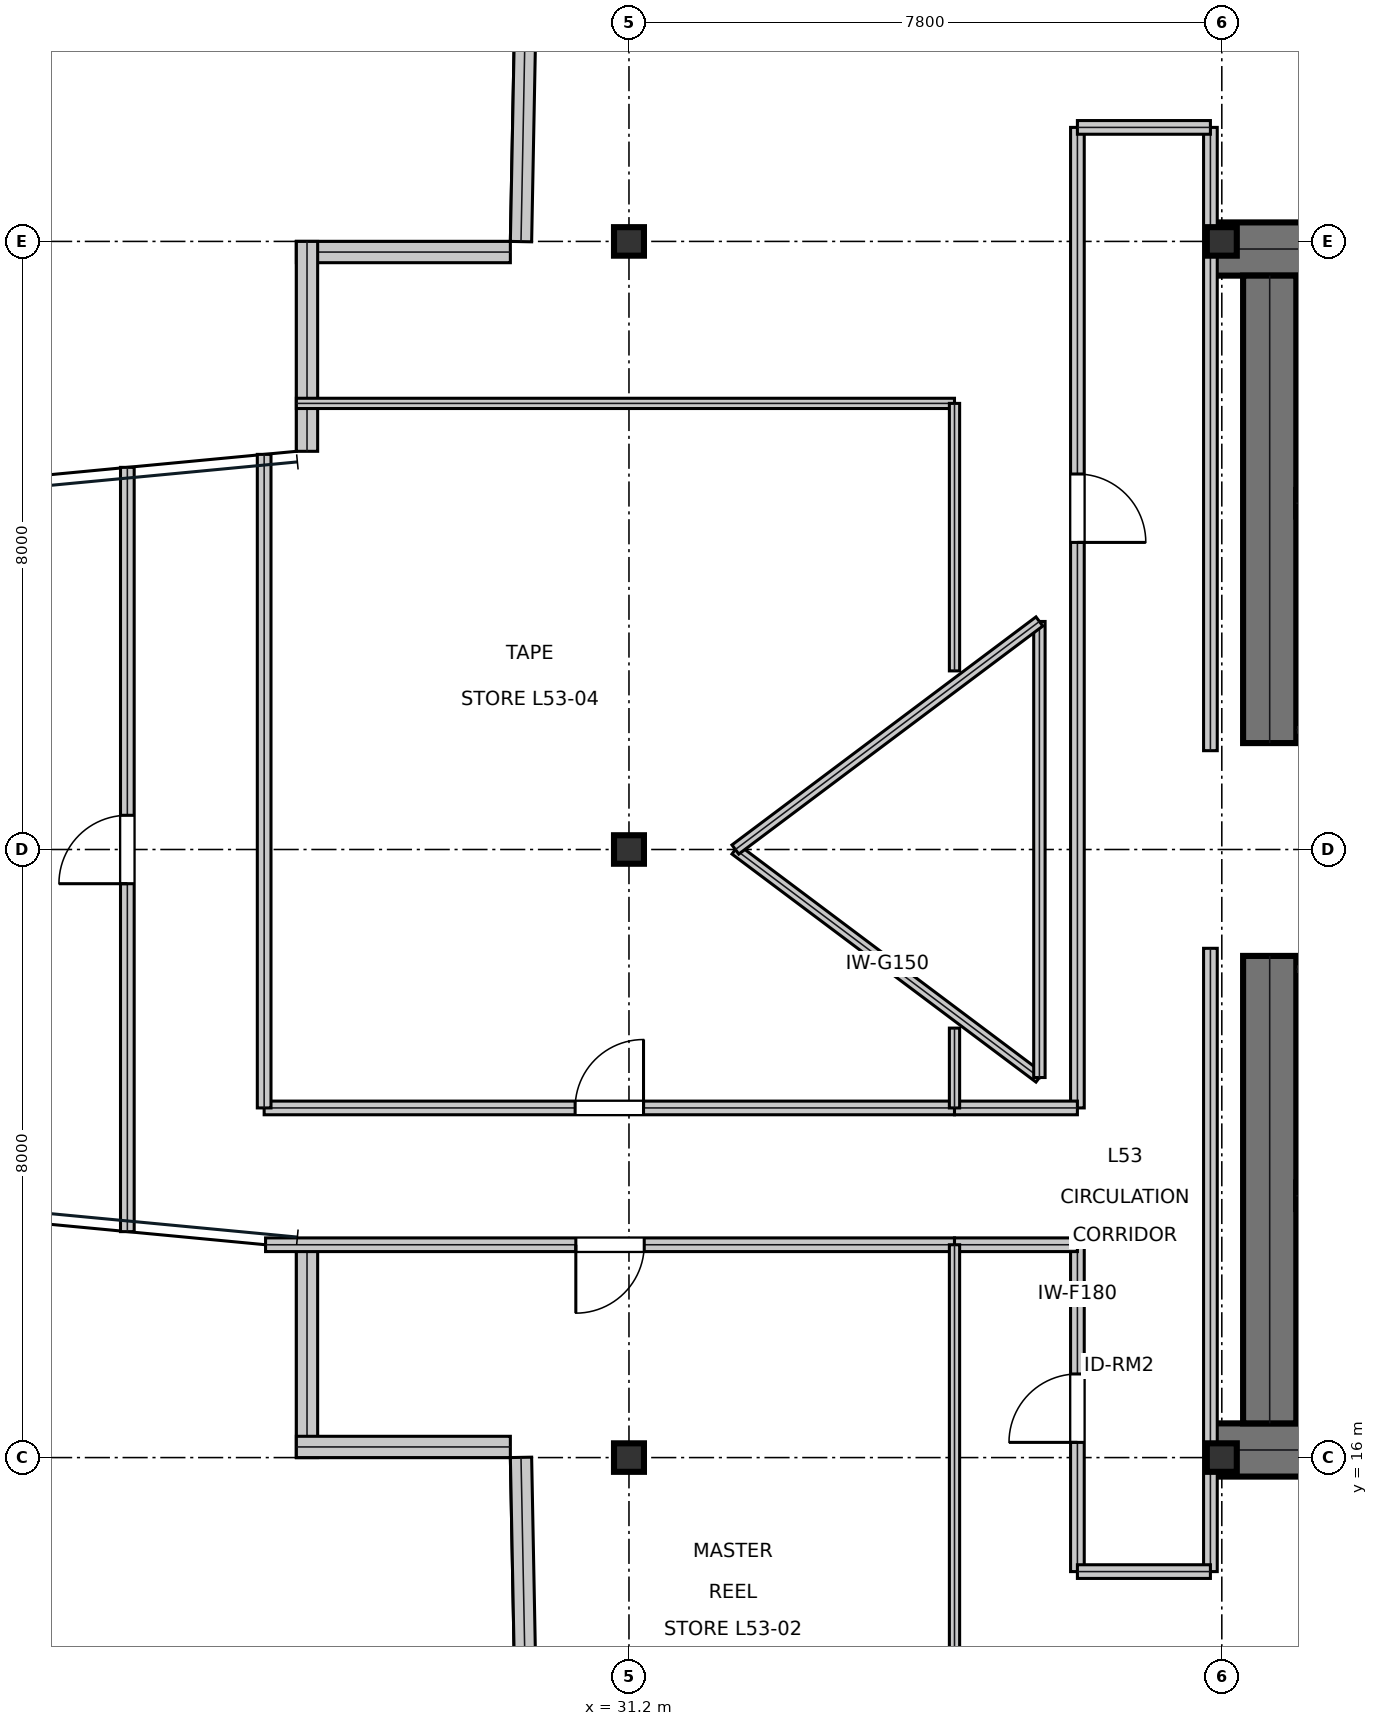
"""IFC4 building model, lengths in metres.
Left out: names, types, materials, properties, quantities, classifications, styles, units other than length and angle.
Written with IfcOpenShell. Run it as: python <this file> out.ifc"""

import sys

from ifc_helpers import new_model, si_unit, direction, frame, frame_2d, origin, origin_2d, place, context, subcontext, project, spatial, rectangle, i_section, extrude, element, fill, save


model = new_model("IFC4")
c1 = context("Model", 3, precision=1e-05, world=origin(), true_north=direction((0.0, 1.0)))
c2 = subcontext(c1, "Body", "Model", "MODEL_VIEW")
j1 = project(units=[si_unit("LENGTHUNIT", "METRE"), si_unit("PLANEANGLEUNIT", "RADIAN")], contexts=[c1])
p1 = place(None, origin())
s1 = spatial("IfcSite", under=j1, at=p1, CompositionType="ELEMENT")
p2 = place(p1, origin())
s2 = spatial("IfcBuilding", under=s1, at=p2, CompositionType="ELEMENT")
p3 = place(p2, frame((0.0, 0.0, 228.3)))
s3 = spatial("IfcBuildingStorey", under=s2, at=p3, CompositionType="ELEMENT", Elevation=228.3)
for number, where, z_axis, x_axis in (
    (1, (38.8, 31.9, 0.0), (0.0, 0.0, 1.0), (1.0, 0.0, 0.0)),
    (2, (38.8, 16.1, 0.0), (0.0, 0.0, 1.0), (1.0, 0.0, 0.0)),
):
    element("IfcWall", number, at=place(p3, frame(where, z_axis=z_axis, x_axis=x_axis)), inside=s3, PredefinedType="SHEAR", context=c2, shape_type="SweptSolid", body=[
        extrude(rectangle(XDim=16.0, YDim=0.7, at=frame_2d((8.0, 0.0))), origin(), (0.0, 0.0, 1.0), 3.79),
    ])
for number, where, z_axis, x_axis in (
    (3, (39.63, 16.45, 0.0), (0.0, 0.0, 1.0), (0.0, 1.0, 0.0)),
    (4, (39.63, 25.4, 0.0), (0.0, 0.0, 1.0), (0.0, 1.0, 0.0)),
):
    element("IfcWall", number, at=place(p3, frame(where, z_axis=z_axis, x_axis=x_axis)), inside=s3, PredefinedType="SHEAR", context=c2, shape_type="SweptSolid", body=[
        extrude(rectangle(XDim=6.15, YDim=0.7, at=frame_2d((3.075, 0.0))), origin(), (0.0, 0.0, 1.0), 3.79),
    ])
p4 = place(p3, frame((39.98, 28.555, 0.0), z_axis=(0.0, 0.0, 1.0), x_axis=(1.0, 0.0, 0.0)))
e5 = element("IfcWall", 5, at=p4, inside=s3, PredefinedType="SHEAR", context=c2, shape_type="SweptSolid", body=[
    extrude(rectangle(XDim=7.71, YDim=0.35, at=frame_2d((3.855, 0.0))), origin(), (0.0, 0.0, 1.0), 3.79),
])
p5 = place(p4, frame((0.25, 0.0, 0.0)))
e6 = element("IfcOpeningElement", 6, at=p5, cuts=e5, PredefinedType="OPENING", context=c2, shape_type="SweptSolid", body=[
    extrude(rectangle(XDim=1.1, YDim=2.15, at=frame_2d((0.55, 1.075))), frame((0.0, 0.185, 0.0), z_axis=(0.0, -1.0, 0.0), x_axis=(1.0, 0.0, 0.0)), (0.0, 0.0, 1.0), 0.37),
])
p6 = place(p3, frame((39.98, 19.445, 0.0), z_axis=(0.0, 0.0, 1.0), x_axis=(1.0, 0.0, 0.0)))
e7 = element("IfcWall", 7, at=p6, inside=s3, PredefinedType="SHEAR", context=c2, shape_type="SweptSolid", body=[
    extrude(rectangle(XDim=7.71, YDim=0.35, at=frame_2d((3.855, 0.0))), origin(), (0.0, 0.0, 1.0), 3.79),
])
p7 = place(p6, frame((0.25, 0.0, 0.0)))
e8 = element("IfcOpeningElement", 8, at=p7, cuts=e7, PredefinedType="OPENING", context=c2, shape_type="SweptSolid", body=[
    extrude(rectangle(XDim=1.1, YDim=2.15, at=frame_2d((0.55, 1.075))), frame((0.0, 0.185, 0.0), z_axis=(0.0, -1.0, 0.0), x_axis=(1.0, 0.0, 0.0)), (0.0, 0.0, 1.0), 0.37),
])
for number, where, z_axis, x_axis in (
    (9, (31.2, 16.0, 0.0), (0.0, 0.0, 1.0), (1.0, 0.0, 0.0)),
    (10, (31.2, 24.0, 0.0), (0.0, 0.0, 1.0), (1.0, 0.0, 0.0)),
    (11, (31.2, 32.0, 0.0), (0.0, 0.0, 1.0), (1.0, 0.0, 0.0)),
    (12, (39.0, 16.0, 0.0), (0.0, 0.0, 1.0), (1.0, 0.0, 0.0)),
    (13, (39.0, 32.0, 0.0), (0.0, 0.0, 1.0), (1.0, 0.0, 0.0)),
):
    element("IfcColumn", number, at=place(p3, frame(where, z_axis=z_axis, x_axis=x_axis)), inside=s3, PredefinedType="COLUMN", context=c2, shape_type="SweptSolid", body=[
        extrude(i_section(OverallWidth=0.394, OverallDepth=0.375, WebThickness=0.017, FlangeThickness=0.028, at=origin_2d()), origin(), (0.0, 0.0, 1.0), 4.044),
    ])
p8 = place(p3, frame((29.917, 39.19, 0.0), z_axis=(0.0, 0.0, 1.0), x_axis=(-0.019207643139, -0.999815516205, 0.0)))
e14 = element("IfcWall", 14, at=p8, inside=s3, PredefinedType="STANDARD", context=c2, shape_type="SweptSolid", body=[
    extrude(rectangle(XDim=7.194, YDim=0.28, at=frame_2d((3.597, 0.0))), origin(), (0.0, 0.0, 1.0), 3.79),
])
p9 = place(p3, frame((29.639, 31.86, 0.0), z_axis=(0.0, 0.0, 1.0), x_axis=(-1.0, 0.0, 0.0)))
e15 = element("IfcWall", 15, at=p9, inside=s3, PredefinedType="STANDARD", context=c2, shape_type="SweptSolid", body=[
    extrude(rectangle(XDim=2.815, YDim=0.28, at=frame_2d((1.408, 0.0))), origin(), (0.0, 0.0, 1.0), 3.79),
])
for number, where, z_axis, x_axis in (
    (16, (26.964, 32.0, 0.0), (0.0, 0.0, 1.0), (0.0, -1.0, 0.0)),
    (17, (26.964, 18.761, 0.0), (0.0, 0.0, 1.0), (0.0, -1.0, 0.0)),
):
    element("IfcWall", number, at=place(p3, frame(where, z_axis=z_axis, x_axis=x_axis)), inside=s3, PredefinedType="STANDARD", context=c2, shape_type="SweptSolid", body=[
        extrude(rectangle(XDim=2.761, YDim=0.28, at=frame_2d((1.381, 0.0))), origin(), (0.0, 0.0, 1.0), 3.319),
    ])
p10 = place(p3, frame((26.824, 16.14, 0.0), z_axis=(0.0, 0.0, 1.0), x_axis=(1.0, 0.0, 0.0)))
e18 = element("IfcWall", 18, at=p10, inside=s3, PredefinedType="STANDARD", context=c2, shape_type="SweptSolid", body=[
    extrude(rectangle(XDim=2.815, YDim=0.28, at=frame_2d((1.408, 0.0))), origin(), (0.0, 0.0, 1.0), 3.79),
])
p11 = place(p3, frame((29.779, 16.003, 0.0), z_axis=(0.0, 0.0, 1.0), x_axis=(0.019207643139, -0.999815516205, 0.0)))
e19 = element("IfcWall", 19, at=p11, inside=s3, PredefinedType="STANDARD", context=c2, shape_type="SweptSolid", body=[
    extrude(rectangle(XDim=7.194, YDim=0.28, at=frame_2d((3.597, 0.0))), origin(), (0.0, 0.0, 1.0), 3.79),
])
p12 = place(p3, frame((39.98, 25.575, 0.0), z_axis=(0.0, 0.0, 1.0), x_axis=(1.0, 0.0, 0.0)))
e20 = element("IfcWall", 20, at=p12, inside=s3, PredefinedType="PARTITIONING", context=c2, shape_type="SweptSolid", body=[
    extrude(rectangle(XDim=5.9, YDim=0.15, at=frame_2d((2.95, 0.0))), origin(), (0.0, 0.0, 1.0), 3.79),
])
p13 = place(p12, frame((2.35, 0.0, 0.0)))
e21 = element("IfcOpeningElement", 21, at=p13, cuts=e20, PredefinedType="OPENING", context=c2, shape_type="SweptSolid", body=[
    extrude(rectangle(XDim=1.05, YDim=2.15, at=frame_2d((0.525, 1.075))), frame((0.0, 0.085, 0.0), z_axis=(0.0, -1.0, 0.0), x_axis=(1.0, 0.0, 0.0)), (0.0, 0.0, 1.0), 0.17),
])
p14 = place(p3, frame((39.98, 22.425, 0.0), z_axis=(0.0, 0.0, 1.0), x_axis=(1.0, 0.0, 0.0)))
e22 = element("IfcWall", 22, at=p14, inside=s3, PredefinedType="PARTITIONING", context=c2, shape_type="SweptSolid", body=[
    extrude(rectangle(XDim=5.9, YDim=0.15, at=frame_2d((2.95, 0.0))), origin(), (0.0, 0.0, 1.0), 3.79),
])
p15 = place(p14, frame((2.35, 0.0, 0.0)))
e23 = element("IfcOpeningElement", 23, at=p15, cuts=e22, PredefinedType="OPENING", context=c2, shape_type="SweptSolid", body=[
    extrude(rectangle(XDim=1.05, YDim=2.15, at=frame_2d((0.525, 1.075))), frame((0.0, 0.085, 0.0), z_axis=(0.0, -1.0, 0.0), x_axis=(1.0, 0.0, 0.0)), (0.0, 0.0, 1.0), 0.17),
])
p16 = place(p3, frame((37.1, 14.5, 0.0), z_axis=(0.0, 0.0, 1.0), x_axis=(0.0, 1.0, 0.0)))
e24 = element("IfcWall", 24, at=p16, inside=s3, PredefinedType="SOLIDWALL", context=c2, shape_type="SweptSolid", body=[
    extrude(rectangle(XDim=4.3, YDim=0.18, at=frame_2d((2.15, 0.0))), origin(), (0.0, 0.0, 1.0), 3.241),
])
p17 = place(p16, frame((1.7, 0.0, 0.0)))
e25 = element("IfcOpeningElement", 25, at=p17, cuts=e24, PredefinedType="OPENING", context=c2, shape_type="SweptSolid", body=[
    extrude(rectangle(XDim=0.9, YDim=2.15, at=frame_2d((0.45, 1.075))), frame((0.0, 0.1, 0.0), z_axis=(0.0, -1.0, 0.0), x_axis=(1.0, 0.0, 0.0)), (0.0, 0.0, 1.0), 0.2),
])
p18 = place(p3, frame((26.418, 18.8, 0.0), z_axis=(0.0, 0.0, 1.0), x_axis=(1.0, 0.0, 0.0)))
e26 = element("IfcWall", 26, at=p18, inside=s3, PredefinedType="SOLIDWALL", context=c2, shape_type="SweptSolid", body=[
    extrude(rectangle(XDim=9.064, YDim=0.18, at=frame_2d((4.532, 0.0))), origin(), (0.0, 0.0, 1.0), 3.241),
])
p19 = place(p18, frame((4.082, 0.0, 0.0)))
e27 = element("IfcOpeningElement", 27, at=p19, cuts=e26, PredefinedType="OPENING", context=c2, shape_type="SweptSolid", body=[
    extrude(rectangle(XDim=0.9, YDim=2.15, at=frame_2d((0.45, 1.075))), frame((0.0, 0.1, 0.0), z_axis=(0.0, -1.0, 0.0), x_axis=(1.0, 0.0, 0.0)), (0.0, 0.0, 1.0), 0.2),
])
p20 = place(p3, frame((24.6, 18.973, 0.0), z_axis=(0.0, 0.0, 1.0), x_axis=(0.0, 1.0, 0.0)))
e28 = element("IfcWall", 28, at=p20, inside=s3, PredefinedType="SOLIDWALL", context=c2, shape_type="SweptSolid", body=[
    extrude(rectangle(XDim=10.055, YDim=0.18, at=frame_2d((5.027, 0.0))), origin(), (0.0, 0.0, 1.0), 3.241),
])
p21 = place(p20, frame((4.577, 0.0, 0.0)))
e29 = element("IfcOpeningElement", 29, at=p21, cuts=e28, PredefinedType="OPENING", context=c2, shape_type="SweptSolid", body=[
    extrude(rectangle(XDim=0.9, YDim=2.15, at=frame_2d((0.45, 1.075))), frame((0.0, 0.1, 0.0), z_axis=(0.0, -1.0, 0.0), x_axis=(1.0, 0.0, 0.0)), (0.0, 0.0, 1.0), 0.2),
])
p22 = place(p3, frame((26.4, 20.6, 0.0), z_axis=(0.0, 0.0, 1.0), x_axis=(1.0, 0.0, 0.0)))
e30 = element("IfcWall", 30, at=p22, inside=s3, PredefinedType="SOLIDWALL", context=c2, shape_type="SweptSolid", body=[
    extrude(rectangle(XDim=9.083, YDim=0.18, at=frame_2d((4.542, 0.0))), origin(), (0.0, 0.0, 1.0), 3.241),
])
p23 = place(p22, frame((4.092, 0.0, 0.0)))
e31 = element("IfcOpeningElement", 31, at=p23, cuts=e30, PredefinedType="OPENING", context=c2, shape_type="SweptSolid", body=[
    extrude(rectangle(XDim=0.9, YDim=2.15, at=frame_2d((0.45, 1.075))), frame((0.0, 0.1, 0.0), z_axis=(0.0, -1.0, 0.0), x_axis=(1.0, 0.0, 0.0)), (0.0, 0.0, 1.0), 0.2),
])
p24 = place(p3, frame((37.1, 20.6, 0.0), z_axis=(0.0, 0.0, 1.0), x_axis=(0.0, 1.0, 0.0)))
e32 = element("IfcWall", 32, at=p24, inside=s3, PredefinedType="SOLIDWALL", context=c2, shape_type="SweptSolid", body=[
    extrude(rectangle(XDim=12.9, YDim=0.18, at=frame_2d((6.45, 0.0))), origin(), (0.0, 0.0, 1.0), 3.241),
])
p25 = place(p24, frame((7.44, 0.0, 0.0)))
e33 = element("IfcOpeningElement", 33, at=p25, cuts=e32, PredefinedType="OPENING", context=c2, shape_type="SweptSolid", body=[
    extrude(rectangle(XDim=0.9, YDim=2.15, at=frame_2d((0.45, 1.075))), frame((0.0, 0.1, 0.0), z_axis=(0.0, -1.0, 0.0), x_axis=(1.0, 0.0, 0.0)), (0.0, 0.0, 1.0), 0.2),
])
p26 = place(p3, frame((38.85, 14.5, 0.0), z_axis=(0.0, 0.0, 1.0), x_axis=(0.0, 1.0, 0.0)))
e34 = element("IfcWall", 34, at=p26, inside=s3, PredefinedType="SOLIDWALL", context=c2, shape_type="SweptSolid", body=[
    extrude(rectangle(XDim=8.2, YDim=0.18, at=frame_2d((4.1, 0.0))), origin(), (0.0, 0.0, 1.0), 3.241),
])
p27 = place(p3, frame((37.1, 14.5, 0.0), z_axis=(0.0, 0.0, 1.0), x_axis=(1.0, 0.0, 0.0)))
e35 = element("IfcWall", 35, at=p27, inside=s3, PredefinedType="SOLIDWALL", context=c2, shape_type="SweptSolid", body=[
    extrude(rectangle(XDim=1.75, YDim=0.18, at=frame_2d((0.875, 0.0))), origin(), (0.0, 0.0, 1.0), 3.241),
])
p28 = place(p3, frame((35.483, 18.8, 0.0), z_axis=(0.0, 0.0, 1.0), x_axis=(1.0, 0.0, 0.0)))
e36 = element("IfcWall", 36, at=p28, inside=s3, PredefinedType="SOLIDWALL", context=c2, shape_type="SweptSolid", body=[
    extrude(rectangle(XDim=1.617, YDim=0.18, at=frame_2d((0.809, 0.0))), origin(), (0.0, 0.0, 1.0), 3.79),
])
p29 = place(p3, frame((26.4, 20.6, 0.0), z_axis=(0.0, 0.0, 1.0), x_axis=(0.0, 1.0, 0.0)))
e37 = element("IfcWall", 37, at=p29, inside=s3, PredefinedType="SOLIDWALL", context=c2, shape_type="SweptSolid", body=[
    extrude(rectangle(XDim=8.598, YDim=0.18, at=frame_2d((4.299, 0.0))), origin(), (0.0, 0.0, 1.0), 3.241),
])
p30 = place(p3, frame((38.85, 25.3, 0.0), z_axis=(0.0, 0.0, 1.0), x_axis=(0.0, 1.0, 0.0)))
e38 = element("IfcWall", 38, at=p30, inside=s3, PredefinedType="SOLIDWALL", context=c2, shape_type="SweptSolid", body=[
    extrude(rectangle(XDim=8.2, YDim=0.18, at=frame_2d((4.1, 0.0))), origin(), (0.0, 0.0, 1.0), 3.241),
])
p31 = place(p3, frame((37.1, 33.5, 0.0), z_axis=(0.0, 0.0, 1.0), x_axis=(1.0, 0.0, 0.0)))
e39 = element("IfcWall", 39, at=p31, inside=s3, PredefinedType="SOLIDWALL", context=c2, shape_type="SweptSolid", body=[
    extrude(rectangle(XDim=1.75, YDim=0.18, at=frame_2d((0.875, 0.0))), origin(), (0.0, 0.0, 1.0), 3.241),
])
p32 = place(p3, frame((35.483, 20.6, 0.0), z_axis=(0.0, 0.0, 1.0), x_axis=(1.0, 0.0, 0.0)))
e40 = element("IfcWall", 40, at=p32, inside=s3, PredefinedType="SOLIDWALL", context=c2, shape_type="SweptSolid", body=[
    extrude(rectangle(XDim=1.617, YDim=0.18, at=frame_2d((0.809, 0.0))), origin(), (0.0, 0.0, 1.0), 3.468),
])
p33 = place(p3, frame((35.483, 7.71, 0.0), z_axis=(0.0, 0.0, 1.0), x_axis=(0.0, 1.0, 0.0)))
e41 = element("IfcWall", 41, at=p33, inside=s3, PredefinedType="PARTITIONING", context=c2, shape_type="SweptSolid", body=[
    extrude(rectangle(XDim=11.09, YDim=0.135, at=frame_2d((5.545, 0.0))), origin(), (0.0, 0.0, 1.0), 3.241),
])
p34 = place(p3, frame((26.824, 29.869, 0.0), z_axis=(0.0, 0.0, 1.0), x_axis=(1.0, 0.0, 0.0)))
e42 = element("IfcWall", 42, at=p34, inside=s3, PredefinedType="PARTITIONING", context=c2, shape_type="SweptSolid", body=[
    extrude(rectangle(XDim=8.659, YDim=0.135, at=frame_2d((4.33, 0.0))), origin(), (0.0, 0.0, 1.0), 3.241),
])
p35 = place(p3, frame((35.483, 26.35, 0.0), z_axis=(0.0, 0.0, 1.0), x_axis=(0.0, 1.0, 0.0)))
e43 = element("IfcWall", 43, at=p35, inside=s3, PredefinedType="PARTITIONING", context=c2, shape_type="SweptSolid", body=[
    extrude(rectangle(XDim=3.519, YDim=0.135, at=frame_2d((1.76, 0.0))), origin(), (0.0, 0.0, 1.0), 3.468),
])
p36 = place(p3, frame((35.483, 20.6, 0.0), z_axis=(0.0, 0.0, 1.0), x_axis=(0.0, 1.0, 0.0)))
e44 = element("IfcWall", 44, at=p36, inside=s3, PredefinedType="PARTITIONING", context=c2, shape_type="SweptSolid", body=[
    extrude(rectangle(XDim=1.05, YDim=0.135, at=frame_2d((0.525, 0.0))), origin(), (0.0, 0.0, 1.0), 3.79),
])
p37 = place(p3, frame((32.6, 24.0, 0.0), z_axis=(0.0, 0.0, 1.0), x_axis=(0.8, -0.6, 0.0)))
e45 = element("IfcWall", 45, at=p37, inside=s3, PredefinedType="MOVABLE", context=c2, shape_type="SweptSolid", body=[
    extrude(rectangle(XDim=5.0, YDim=0.15, at=frame_2d((2.5, 0.0))), origin(), (0.0, 0.0, 1.0), 3.79),
])
p38 = place(p3, frame((36.6, 21.0, 0.0), z_axis=(0.0, 0.0, 1.0), x_axis=(0.0, 1.0, 0.0)))
e46 = element("IfcWall", 46, at=p38, inside=s3, PredefinedType="MOVABLE", context=c2, shape_type="SweptSolid", body=[
    extrude(rectangle(XDim=6.0, YDim=0.15, at=frame_2d((3.0, 0.0))), origin(), (0.0, 0.0, 1.0), 3.79),
])
p39 = place(p3, frame((36.6, 27.0, 0.0), z_axis=(0.0, 0.0, 1.0), x_axis=(-0.8, -0.6, 0.0)))
e47 = element("IfcWall", 47, at=p39, inside=s3, PredefinedType="MOVABLE", context=c2, shape_type="SweptSolid", body=[
    extrude(rectangle(XDim=5.0, YDim=0.15, at=frame_2d((2.5, 0.0))), origin(), (0.0, 0.0, 1.0), 3.79),
])
p40 = place(p17, origin())
e48 = element("IfcDoor", 48, at=p40, inside=s3, OperationType="SINGLE_SWING_LEFT", PredefinedType="DOOR", context=c2, shape_type="SweptSolid", body=[
    extrude(rectangle(XDim=0.9, YDim=2.15, at=frame_2d((0.45, 1.075))), frame((0.0, 0.025, 0.0), z_axis=(0.0, -1.0, 0.0), x_axis=(1.0, 0.0, 0.0)), (0.0, 0.0, 1.0), 0.05),
])
fill(e25, e48)
p41 = place(p19, frame((0.9, 0.0, 0.0), z_axis=(0.0, 0.0, 1.0), x_axis=(-1.0, 0.0, 0.0)))
e49 = element("IfcDoor", 49, at=p41, inside=s3, OperationType="SINGLE_SWING_RIGHT", PredefinedType="DOOR", context=c2, shape_type="SweptSolid", body=[
    extrude(rectangle(XDim=0.9, YDim=2.15, at=frame_2d((0.45, 1.075))), frame((0.0, 0.025, 0.0), z_axis=(0.0, -1.0, 0.0), x_axis=(1.0, 0.0, 0.0)), (0.0, 0.0, 1.0), 0.05),
])
fill(e27, e49)
p42 = place(p21, origin())
e50 = element("IfcDoor", 50, at=p42, inside=s3, OperationType="SINGLE_SWING_LEFT", PredefinedType="DOOR", context=c2, shape_type="SweptSolid", body=[
    extrude(rectangle(XDim=0.9, YDim=2.15, at=frame_2d((0.45, 1.075))), frame((0.0, 0.025, 0.0), z_axis=(0.0, -1.0, 0.0), x_axis=(1.0, 0.0, 0.0)), (0.0, 0.0, 1.0), 0.05),
])
fill(e29, e50)
p43 = place(p23, origin())
e51 = element("IfcDoor", 51, at=p43, inside=s3, OperationType="SINGLE_SWING_RIGHT", PredefinedType="DOOR", context=c2, shape_type="SweptSolid", body=[
    extrude(rectangle(XDim=0.9, YDim=2.15, at=frame_2d((0.45, 1.075))), frame((0.0, 0.025, 0.0), z_axis=(0.0, -1.0, 0.0), x_axis=(1.0, 0.0, 0.0)), (0.0, 0.0, 1.0), 0.05),
])
fill(e31, e51)
p44 = place(p25, frame((0.9, 0.0, 0.0), z_axis=(0.0, 0.0, 1.0), x_axis=(-1.0, 0.0, 0.0)))
e52 = element("IfcDoor", 52, at=p44, inside=s3, OperationType="SINGLE_SWING_RIGHT", PredefinedType="DOOR", context=c2, shape_type="SweptSolid", body=[
    extrude(rectangle(XDim=0.9, YDim=2.15, at=frame_2d((0.45, 1.075))), frame((0.0, 0.025, 0.0), z_axis=(0.0, -1.0, 0.0), x_axis=(1.0, 0.0, 0.0)), (0.0, 0.0, 1.0), 0.05),
])
fill(e33, e52)
save(model, sys.argv[1])
